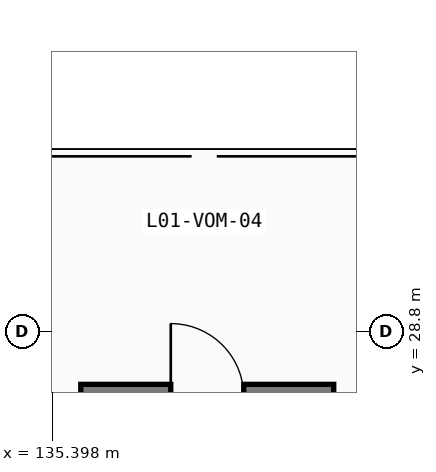
"""IFC4 building model, lengths in metres.
Left out: names, types, materials, properties, quantities, classifications, styles, units other than length and angle.
Written with IfcOpenShell. Run it as: python <this file> out.ifc"""

import sys

from ifc_helpers import new_model, si_unit, direction, frame, frame_2d, origin, place, context, subcontext, project, spatial, rectangle, extrude, element, save


model = new_model("IFC4")
c1 = context("Model", 3, precision=1e-05, world=origin(), true_north=direction((0.0, 1.0)))
c2 = subcontext(c1, "Body", "Model", "MODEL_VIEW")
j1 = project(units=[si_unit("LENGTHUNIT", "METRE"), si_unit("PLANEANGLEUNIT", "RADIAN")], contexts=[c1])
p1 = place(None, origin())
s1 = spatial("IfcSite", under=j1, at=p1, CompositionType="ELEMENT")
p2 = place(p1, origin())
s2 = spatial("IfcBuilding", under=s1, at=p2, CompositionType="ELEMENT")
p3 = place(p2, frame((0.0, 0.0, 4.8)))
s3 = spatial("IfcBuildingStorey", under=s2, at=p3, CompositionType="ELEMENT", Elevation=4.8)
p4 = place(p3, frame((140.03, 27.73, 0.0), z_axis=(0.0, 0.0, 1.0), x_axis=(-1.0, 0.0, 0.0)))
e1 = element("IfcWall", 1, at=p4, inside=s3, PredefinedType="SHEAR", context=c2, shape_type="SweptSolid", body=[
    extrude(rectangle(XDim=4.16, YDim=0.4, at=frame_2d((2.08, 0.0))), origin(), (0.0, 0.0, 1.0), 4.52),
])
p5 = place(p4, frame((2.68, 0.0, 0.0), z_axis=(0.0, 0.0, 1.0), x_axis=(-1.0, 0.0, 0.0)))
e2 = element("IfcOpeningElement", 2, at=p5, cuts=e1, PredefinedType="OPENING", context=c2, shape_type="SweptSolid", body=[
    extrude(rectangle(XDim=1.2, YDim=2.2, at=frame_2d((0.6, 1.1))), frame((0.0, 0.21, 0.0), z_axis=(0.0, -1.0, 0.0), x_axis=(1.0, 0.0, 0.0)), (0.0, 0.0, 1.0), 0.42),
])
save(model, sys.argv[1])
